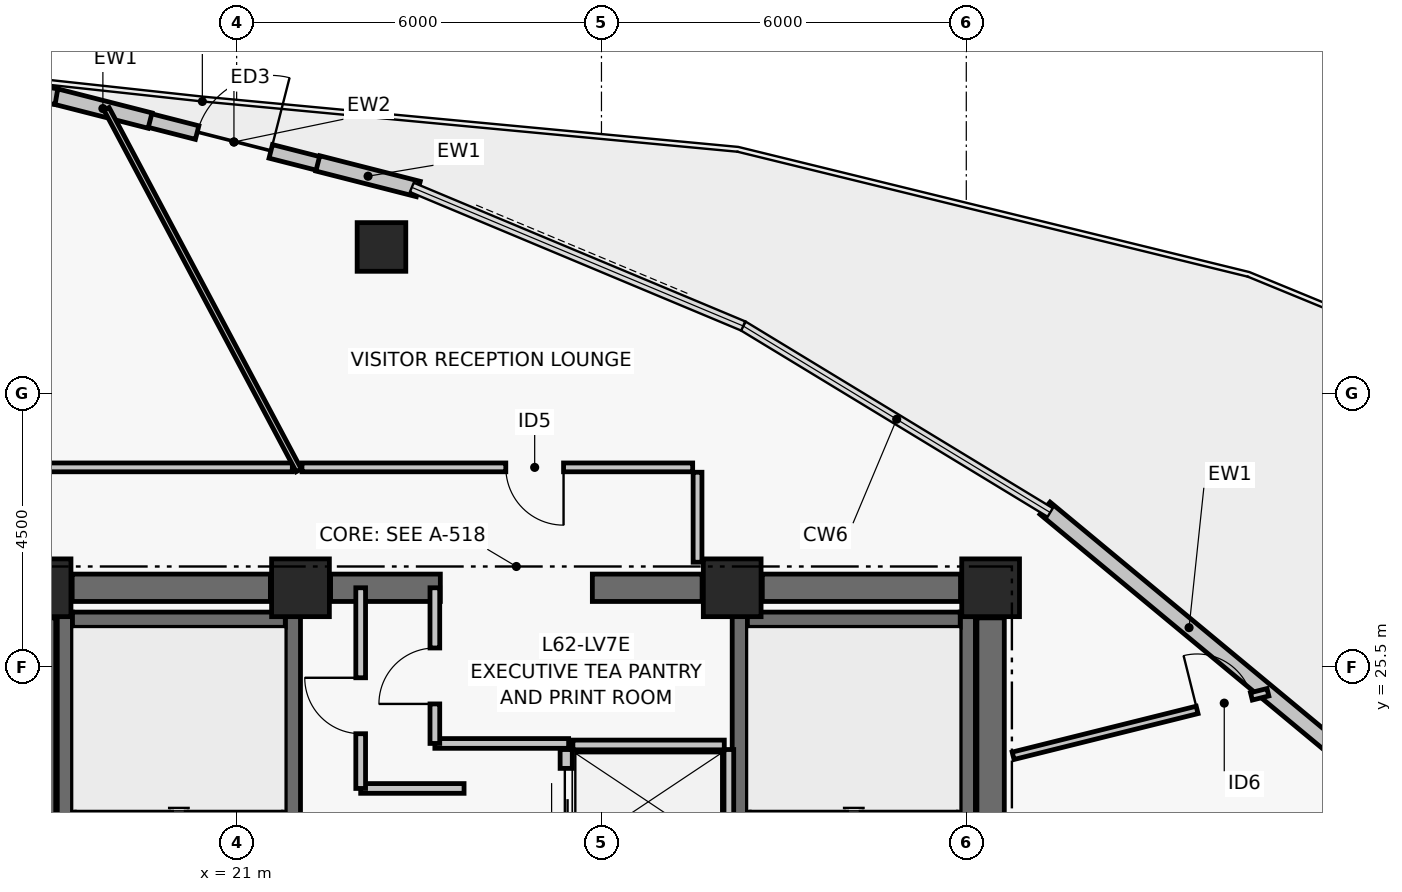
"""IFC4 building model, lengths in metres.
Left out: names, types, materials, properties, quantities, classifications, styles, units other than length and angle.
Written with IfcOpenShell. Run it as: python <this file> out.ifc"""

import sys

from ifc_helpers import new_model, si_unit, direction, frame, frame_2d, origin, origin_2d, place, context, subcontext, project, spatial, rectangle, hollow_rectangle, extrude, element, fill, save


model = new_model("IFC4")
c1 = context("Model", 3, precision=1e-05, world=origin(), true_north=direction((0.0, 1.0)))
c2 = subcontext(c1, "Body", "Model", "MODEL_VIEW")
j1 = project(units=[si_unit("LENGTHUNIT", "METRE"), si_unit("PLANEANGLEUNIT", "RADIAN")], contexts=[c1])
p1 = place(None, origin())
s1 = spatial("IfcSite", under=j1, at=p1, CompositionType="ELEMENT")
p2 = place(p1, origin())
s2 = spatial("IfcBuilding", under=s1, at=p2, CompositionType="ELEMENT")
p3 = place(p2, frame((0.0, 0.0, 247.14)))
s3 = spatial("IfcBuildingStorey", under=s2, at=p3, CompositionType="ELEMENT", Elevation=247.14)
for number, where, z_axis, x_axis in (
    (1, (17.8, 26.8, 0.0), (0.0, 0.0, 1.0), (1.0, 0.0, 0.0)),
    (2, (22.05, 26.8, 0.0), (0.0, 0.0, 1.0), (1.0, 0.0, 0.0)),
    (3, (29.15, 26.8, 0.0), (0.0, 0.0, 1.0), (1.0, 0.0, 0.0)),
    (4, (33.4, 26.8, 0.0), (0.0, 0.0, 1.0), (1.0, 0.0, 0.0)),
):
    element("IfcColumn", number, at=place(p3, frame(where, z_axis=z_axis, x_axis=x_axis)), inside=s3, PredefinedType="COLUMN", context=c2, shape_type="SweptSolid", body=[
        extrude(rectangle(XDim=0.95, YDim=0.95, at=origin_2d()), origin(), (0.0, 0.0, 1.0), 3.72),
    ])
p4 = place(p3, frame((18.295, 26.8, 0.0), z_axis=(0.0, 0.0, 1.0), x_axis=(1.0, 0.0, 0.0)))
e5 = element("IfcWall", 5, at=p4, inside=s3, PredefinedType="SHEAR", context=c2, shape_type="SweptSolid", body=[
    extrude(rectangle(XDim=3.26, YDim=0.45, at=frame_2d((1.63, 0.0))), origin(), (0.0, 0.0, 1.0), 3.5),
])
p5 = place(p3, frame((22.545, 26.8, 0.0), z_axis=(0.0, 0.0, 1.0), x_axis=(1.0, 0.0, 0.0)))
e6 = element("IfcWall", 6, at=p5, inside=s3, PredefinedType="SHEAR", context=c2, shape_type="SweptSolid", body=[
    extrude(rectangle(XDim=1.805, YDim=0.45, at=frame_2d((0.903, 0.0))), origin(), (0.0, 0.0, 1.0), 3.5),
])
p6 = place(p3, frame((26.85, 26.8, 0.0), z_axis=(0.0, 0.0, 1.0), x_axis=(1.0, 0.0, 0.0)))
e7 = element("IfcWall", 7, at=p6, inside=s3, PredefinedType="SHEAR", context=c2, shape_type="SweptSolid", body=[
    extrude(rectangle(XDim=1.805, YDim=0.45, at=frame_2d((0.902, 0.0))), origin(), (0.0, 0.0, 1.0), 3.5),
])
p7 = place(p3, frame((29.645, 26.8, 0.0), z_axis=(0.0, 0.0, 1.0), x_axis=(1.0, 0.0, 0.0)))
e8 = element("IfcWall", 8, at=p7, inside=s3, PredefinedType="SHEAR", context=c2, shape_type="SweptSolid", body=[
    extrude(rectangle(XDim=3.26, YDim=0.45, at=frame_2d((1.63, 0.0))), origin(), (0.0, 0.0, 1.0), 3.5),
])
for number, where, z_axis, x_axis in (
    (9, (17.8, 17.695, 0.0), (0.0, 0.0, 1.0), (0.0, 1.0, 0.0)),
    (10, (33.4, 17.695, 0.0), (0.0, 0.0, 1.0), (0.0, 1.0, 0.0)),
):
    element("IfcWall", number, at=place(p3, frame(where, z_axis=z_axis, x_axis=x_axis)), inside=s3, PredefinedType="SHEAR", context=c2, shape_type="SweptSolid", body=[
        extrude(rectangle(XDim=8.61, YDim=0.45, at=frame_2d((4.305, 0.0))), origin(), (0.0, 0.0, 1.0), 3.5),
    ])
p8 = place(p3, frame((18.175, 17.6, 0.0), z_axis=(0.0, 0.0, 1.0), x_axis=(0.0, 1.0, 0.0)))
e11 = element("IfcWall", 11, at=p8, inside=s3, PredefinedType="SHEAR", context=c2, shape_type="SweptSolid", body=[
    extrude(rectangle(XDim=8.8, YDim=0.25, at=frame_2d((4.4, 0.0))), origin(), (0.0, 0.0, 1.0), 3.5),
])
p9 = place(p3, frame((21.925, 17.6, 0.0), z_axis=(0.0, 0.0, 1.0), x_axis=(0.0, 1.0, 0.0)))
e12 = element("IfcWall", 12, at=p9, inside=s3, PredefinedType="SHEAR", context=c2, shape_type="SweptSolid", body=[
    extrude(rectangle(XDim=8.8, YDim=0.25, at=frame_2d((4.4, 0.0))), origin(), (0.0, 0.0, 1.0), 3.5),
])
p10 = place(p9, frame((0.35, 0.0, 0.0)))
e13 = element("IfcOpeningElement", 13, at=p10, cuts=e12, PredefinedType="OPENING", context=c2, shape_type="SweptSolid", body=[
    extrude(rectangle(XDim=1.05, YDim=2.08, at=frame_2d((0.525, 1.04))), frame((0.0, 0.135, 0.0), z_axis=(0.0, -1.0, 0.0), x_axis=(1.0, 0.0, 0.0)), (0.0, 0.0, 1.0), 0.27),
])
p11 = place(p3, frame((18.3, 26.275, 0.0), z_axis=(0.0, 0.0, 1.0), x_axis=(1.0, 0.0, 0.0)))
e14 = element("IfcWall", 14, at=p11, inside=s3, PredefinedType="SHEAR", context=c2, shape_type="SweptSolid", body=[
    extrude(rectangle(XDim=3.5, YDim=0.25, at=frame_2d((1.75, 0.0))), origin(), (0.0, 0.0, 1.0), 3.5),
])
p12 = place(p3, frame((29.275, 17.6, 0.0), z_axis=(0.0, 0.0, 1.0), x_axis=(0.0, 1.0, 0.0)))
e15 = element("IfcWall", 15, at=p12, inside=s3, PredefinedType="SHEAR", context=c2, shape_type="SweptSolid", body=[
    extrude(rectangle(XDim=8.8, YDim=0.25, at=frame_2d((4.4, 0.0))), origin(), (0.0, 0.0, 1.0), 3.5),
])
p13 = place(p12, frame((0.35, 0.0, 0.0)))
e16 = element("IfcOpeningElement", 16, at=p13, cuts=e15, PredefinedType="OPENING", context=c2, shape_type="SweptSolid", body=[
    extrude(rectangle(XDim=1.05, YDim=2.08, at=frame_2d((0.525, 1.04))), frame((0.0, 0.135, 0.0), z_axis=(0.0, -1.0, 0.0), x_axis=(1.0, 0.0, 0.0)), (0.0, 0.0, 1.0), 0.27),
])
p14 = place(p3, frame((33.025, 17.6, 0.0), z_axis=(0.0, 0.0, 1.0), x_axis=(0.0, 1.0, 0.0)))
e17 = element("IfcWall", 17, at=p14, inside=s3, PredefinedType="SHEAR", context=c2, shape_type="SweptSolid", body=[
    extrude(rectangle(XDim=8.8, YDim=0.25, at=frame_2d((4.4, 0.0))), origin(), (0.0, 0.0, 1.0), 3.5),
])
p15 = place(p3, frame((29.4, 26.275, 0.0), z_axis=(0.0, 0.0, 1.0), x_axis=(1.0, 0.0, 0.0)))
e18 = element("IfcWall", 18, at=p15, inside=s3, PredefinedType="SHEAR", context=c2, shape_type="SweptSolid", body=[
    extrude(rectangle(XDim=3.5, YDim=0.25, at=frame_2d((1.75, 0.0))), origin(), (0.0, 0.0, 1.0), 3.5),
])
p16 = place(p3, frame((23.382, 32.405, 0.0), z_axis=(0.0, 0.0, 1.0), x_axis=(1.0, 0.0, 0.0)))
e19 = element("IfcColumn", 19, at=p16, inside=s3, PredefinedType="COLUMN", context=c2, shape_type="SweptSolid", body=[
    extrude(hollow_rectangle(XDim=0.8, YDim=0.8, WallThickness=0.035, at=origin_2d()), origin(), (0.0, 0.0, 1.0), 3.72),
])
p17 = place(p3, frame((19.564, 34.486, 0.0), z_axis=(0.0, 0.0, 1.0), x_axis=(0.968966245317, -0.247193073198, 0.0)))
e20 = element("IfcWall", 20, at=p17, inside=s3, PredefinedType="PARTITIONING", context=c2, shape_type="SweptSolid", body=[
    extrude(rectangle(XDim=2.872, YDim=0.23, at=frame_2d((1.436, 0.0))), origin(), (0.0, 0.0, 1.0), 3.5),
])
p18 = place(p17, frame((0.811, 0.0, 0.0)))
e21 = element("IfcOpeningElement", 21, at=p18, cuts=e20, PredefinedType="OPENING", context=c2, shape_type="SweptSolid", body=[
    extrude(rectangle(XDim=1.25, YDim=2.1, at=frame_2d((0.625, 1.05))), frame((0.0, 0.125, 0.0), z_axis=(0.0, -1.0, 0.0), x_axis=(1.0, 0.0, 0.0)), (0.0, 0.0, 1.0), 0.25),
])
p19 = place(p3, frame((34.295, 28.108, 0.0), z_axis=(0.0, 0.0, 1.0), x_axis=(0.769779830138, -0.638309496337, 0.0)))
e22 = element("IfcWall", 22, at=p19, inside=s3, PredefinedType="PARTITIONING", context=c2, shape_type="SweptSolid", body=[
    extrude(rectangle(XDim=6.154, YDim=0.26, at=frame_2d((3.077, 0.0))), origin(), (0.0, 0.0, 1.0), 3.5),
])
p20 = place(p3, frame((22.335, 33.779, 0.0), z_axis=(0.0, 0.0, 1.0), x_axis=(0.968986308148, -0.247114416055, 0.0)))
e23 = element("IfcWall", 23, at=p20, inside=s3, PredefinedType="PARTITIONING", context=c2, shape_type="SweptSolid", body=[
    extrude(rectangle(XDim=1.705, YDim=0.26, at=frame_2d((0.853, 0.0))), origin(), (0.0, 0.0, 1.0), 3.5),
])
p21 = place(p3, frame((18.024, 34.879, 0.0), z_axis=(0.0, 0.0, 1.0), x_axis=(0.968974449895, -0.247160910036, 0.0)))
e24 = element("IfcWall", 24, at=p21, inside=s3, PredefinedType="PARTITIONING", context=c2, shape_type="SweptSolid", body=[
    extrude(rectangle(XDim=1.601, YDim=0.26, at=frame_2d((0.801, 0.0))), origin(), (0.0, 0.0, 1.0), 3.5),
])
p22 = place(p3, frame((14.9, 35.409, 0.0), z_axis=(0.0, 0.0, 1.0), x_axis=(0.985889432766, -0.167397808709, 0.0)))
e25 = element("IfcWall", 25, at=p22, inside=s3, PredefinedType="PARTITIONING", context=c2, shape_type="SweptSolid", body=[
    extrude(rectangle(XDim=3.181, YDim=0.26, at=frame_2d((1.59, 0.0))), origin(), (0.0, 0.0, 1.0), 3.5),
])
p23 = place(p3, frame((26.42, 22.42, 0.0), z_axis=(0.0, 0.0, 1.0), x_axis=(0.0, 1.0, 0.0)))
e26 = element("IfcWall", 26, at=p23, inside=s3, PredefinedType="PARTITIONING", context=c2, shape_type="SweptSolid", body=[
    extrude(rectangle(XDim=1.72, YDim=0.2, at=frame_2d((0.86, 0.0))), origin(), (0.0, 0.0, 1.0), 3.5),
])
p24 = place(p23, frame((0.31, 0.0, 0.0)))
e27 = element("IfcOpeningElement", 27, at=p24, cuts=e26, PredefinedType="OPENING", context=c2, shape_type="SweptSolid", body=[
    extrude(rectangle(XDim=1.1, YDim=2.08, at=frame_2d((0.55, 1.04))), frame((0.0, 0.11, 0.0), z_axis=(0.0, -1.0, 0.0), x_axis=(1.0, 0.0, 0.0)), (0.0, 0.0, 1.0), 0.22),
])
p25 = place(p3, frame((29.095, 20.56, 0.0), z_axis=(0.0, 0.0, 1.0), x_axis=(0.0, 1.0, 0.0)))
e28 = element("IfcWall", 28, at=p25, inside=s3, PredefinedType="PARTITIONING", context=c2, shape_type="SweptSolid", body=[
    extrude(rectangle(XDim=3.58, YDim=0.16, at=frame_2d((1.79, 0.0))), origin(), (0.0, 0.0, 1.0), 3.5),
])
p26 = place(p3, frame((26.53, 24.215, 0.0), z_axis=(0.0, 0.0, 1.0), x_axis=(1.0, 0.0, 0.0)))
e29 = element("IfcWall", 29, at=p26, inside=s3, PredefinedType="PARTITIONING", context=c2, shape_type="SweptSolid", body=[
    extrude(rectangle(XDim=2.49, YDim=0.16, at=frame_2d((1.245, 0.0))), origin(), (0.0, 0.0, 1.0), 3.5),
])
p27 = place(p3, frame((23.04, 23.5, 0.0), z_axis=(0.0, 0.0, 1.0), x_axis=(1.0, 0.0, 0.0)))
e30 = element("IfcWall", 30, at=p27, inside=s3, PredefinedType="PARTITIONING", context=c2, shape_type="SweptSolid", body=[
    extrude(rectangle(XDim=1.7, YDim=0.16, at=frame_2d((0.85, 0.0))), origin(), (0.0, 0.0, 1.0), 3.5),
])
p28 = place(p3, frame((23.04, 23.5, 0.0), z_axis=(0.0, 0.0, 1.0), x_axis=(0.0, 1.0, 0.0)))
e31 = element("IfcWall", 31, at=p28, inside=s3, PredefinedType="PARTITIONING", context=c2, shape_type="SweptSolid", body=[
    extrude(rectangle(XDim=3.3, YDim=0.16, at=frame_2d((1.65, 0.0))), origin(), (0.0, 0.0, 1.0), 2.63),
])
p29 = place(p28, frame((0.9, 0.0, 0.0)))
e32 = element("IfcOpeningElement", 32, at=p29, cuts=e31, PredefinedType="OPENING", context=c2, shape_type="SweptSolid", body=[
    extrude(rectangle(XDim=0.92, YDim=2.05, at=frame_2d((0.46, 1.025))), frame((0.0, 0.09, 0.0), z_axis=(0.0, -1.0, 0.0), x_axis=(1.0, 0.0, 0.0)), (0.0, 0.0, 1.0), 0.18),
])
p30 = place(p3, frame((24.26, 24.24, 0.0), z_axis=(0.0, 0.0, 1.0), x_axis=(1.0, 0.0, 0.0)))
e33 = element("IfcWall", 33, at=p30, inside=s3, PredefinedType="PARTITIONING", context=c2, shape_type="SweptSolid", body=[
    extrude(rectangle(XDim=2.2, YDim=0.16, at=frame_2d((1.1, 0.0))), origin(), (0.0, 0.0, 1.0), 3.5),
])
p31 = place(p3, frame((24.26, 24.24, 0.0), z_axis=(0.0, 0.0, 1.0), x_axis=(0.0, 1.0, 0.0)))
e34 = element("IfcWall", 34, at=p31, inside=s3, PredefinedType="PARTITIONING", context=c2, shape_type="SweptSolid", body=[
    extrude(rectangle(XDim=2.56, YDim=0.16, at=frame_2d((1.28, 0.0))), origin(), (0.0, 0.0, 1.0), 2.63),
])
p32 = place(p31, frame((0.65, 0.0, 0.0)))
e35 = element("IfcOpeningElement", 35, at=p32, cuts=e34, PredefinedType="OPENING", context=c2, shape_type="SweptSolid", body=[
    extrude(rectangle(XDim=0.92, YDim=2.05, at=frame_2d((0.46, 1.025))), frame((0.0, 0.09, 0.0), z_axis=(0.0, -1.0, 0.0), x_axis=(1.0, 0.0, 0.0)), (0.0, 0.0, 1.0), 0.18),
])
p33 = place(p3, frame((28.58, 27.22, 0.0), z_axis=(0.0, 0.0, 1.0), x_axis=(0.0, 1.0, 0.0)))
e36 = element("IfcWall", 36, at=p33, inside=s3, PredefinedType="PARTITIONING", context=c2, shape_type="SweptSolid", body=[
    extrude(rectangle(XDim=1.48, YDim=0.145, at=frame_2d((0.74, 0.0))), origin(), (0.0, 0.0, 1.0), 2.63),
])
p34 = place(p3, frame((28.5, 28.78, 0.0), z_axis=(0.0, 0.0, 1.0), x_axis=(-1.0, 0.0, 0.0)))
e37 = element("IfcWall", 37, at=p34, inside=s3, PredefinedType="PARTITIONING", context=c2, shape_type="SweptSolid", body=[
    extrude(rectangle(XDim=6.426, YDim=0.145, at=frame_2d((3.213, 0.0))), origin(), (0.0, 0.0, 1.0), 2.78),
])
p35 = place(p34, frame((2.123, 0.0, 0.0)))
e38 = element("IfcOpeningElement", 38, at=p35, cuts=e37, PredefinedType="OPENING", context=c2, shape_type="SweptSolid", body=[
    extrude(rectangle(XDim=0.95, YDim=2.06, at=frame_2d((0.475, 1.03))), frame((0.0, 0.083, 0.0), z_axis=(0.0, -1.0, 0.0), x_axis=(1.0, 0.0, 0.0)), (0.0, 0.0, 1.0), 0.165),
])
p36 = place(p3, frame((21.916, 28.78, 0.0), z_axis=(0.0, 0.0, 1.0), x_axis=(-1.0, 0.0, 0.0)))
e39 = element("IfcWall", 39, at=p36, inside=s3, PredefinedType="PARTITIONING", context=c2, shape_type="SweptSolid", body=[
    extrude(rectangle(XDim=4.376, YDim=0.145, at=frame_2d((2.188, 0.0))), origin(), (0.0, 0.0, 1.0), 3.13),
])
p37 = place(p3, frame((33.77, 24.037, 0.0), z_axis=(0.0, 0.0, 1.0), x_axis=(0.970305215228, 0.241883834312, 0.0)))
e40 = element("IfcWall", 40, at=p37, inside=s3, PredefinedType="PARTITIONING", context=c2, shape_type="SweptSolid", body=[
    extrude(rectangle(XDim=4.319, YDim=0.125, at=frame_2d((2.159, 0.0))), origin(), (0.0, 0.0, 1.0), 2.63),
])
p38 = place(p37, frame((3.119, 0.0, 0.0)))
e41 = element("IfcOpeningElement", 41, at=p38, cuts=e40, PredefinedType="OPENING", context=c2, shape_type="SweptSolid", body=[
    extrude(rectangle(XDim=0.92, YDim=2.05, at=frame_2d((0.46, 1.025))), frame((0.0, 0.073, 0.0), z_axis=(0.0, -1.0, 0.0), x_axis=(1.0, 0.0, 0.0)), (0.0, 0.0, 1.0), 0.145),
])
p39 = place(p3, frame((22.021, 28.73, 0.0), z_axis=(0.0, 0.0, 1.0), x_axis=(-0.469464454367, 0.882951372435, 0.0)))
e42 = element("IfcWall", 42, at=p39, inside=s3, PredefinedType="PARTITIONING", context=c2, shape_type="SweptSolid", body=[
    extrude(rectangle(XDim=6.734, YDim=0.095, at=frame_2d((3.367, 0.0))), origin(), (0.0, 0.0, 1.0), 2.98),
])
p40 = place(p18, origin())
e43 = element("IfcDoor", 43, at=p40, inside=s3, OperationType="SINGLE_SWING_RIGHT", PredefinedType="DOOR", context=c2, shape_type="SweptSolid", body=[
    extrude(rectangle(XDim=1.25, YDim=2.1, at=frame_2d((0.625, 1.05))), frame((0.0, 0.025, 0.0), z_axis=(0.0, -1.0, 0.0), x_axis=(1.0, 0.0, 0.0)), (0.0, 0.0, 1.0), 0.05),
])
fill(e21, e43)
p41 = place(p24, origin())
e44 = element("IfcDoor", 44, at=p41, inside=s3, OperationType="DOUBLE_DOOR_SLIDING", PredefinedType="DOOR", context=c2, shape_type="SweptSolid", body=[
    extrude(rectangle(XDim=1.1, YDim=2.08, at=frame_2d((0.55, 1.04))), frame((0.0, 0.025, 0.0), z_axis=(0.0, -1.0, 0.0), x_axis=(1.0, 0.0, 0.0)), (0.0, 0.0, 1.0), 0.05),
])
fill(e27, e44)
p42 = place(p29, origin())
e45 = element("IfcDoor", 45, at=p42, inside=s3, OperationType="SINGLE_SWING_RIGHT", PredefinedType="DOOR", context=c2, shape_type="SweptSolid", body=[
    extrude(rectangle(XDim=0.92, YDim=2.05, at=frame_2d((0.46, 1.025))), frame((0.0, 0.025, 0.0), z_axis=(0.0, -1.0, 0.0), x_axis=(1.0, 0.0, 0.0)), (0.0, 0.0, 1.0), 0.05),
])
fill(e32, e45)
p43 = place(p32, origin())
e46 = element("IfcDoor", 46, at=p43, inside=s3, OperationType="SINGLE_SWING_LEFT", PredefinedType="DOOR", context=c2, shape_type="SweptSolid", body=[
    extrude(rectangle(XDim=0.92, YDim=2.05, at=frame_2d((0.46, 1.025))), frame((0.0, 0.025, 0.0), z_axis=(0.0, -1.0, 0.0), x_axis=(1.0, 0.0, 0.0)), (0.0, 0.0, 1.0), 0.05),
])
fill(e35, e46)
p44 = place(p35, origin())
e47 = element("IfcDoor", 47, at=p44, inside=s3, OperationType="SINGLE_SWING_LEFT", PredefinedType="DOOR", context=c2, shape_type="SweptSolid", body=[
    extrude(rectangle(XDim=0.95, YDim=2.06, at=frame_2d((0.475, 1.03))), frame((0.0, 0.025, 0.0), z_axis=(0.0, -1.0, 0.0), x_axis=(1.0, 0.0, 0.0)), (0.0, 0.0, 1.0), 0.05),
])
fill(e38, e47)
p45 = place(p38, origin())
e48 = element("IfcDoor", 48, at=p45, inside=s3, OperationType="SINGLE_SWING_LEFT", PredefinedType="DOOR", context=c2, shape_type="SweptSolid", body=[
    extrude(rectangle(XDim=0.92, YDim=2.05, at=frame_2d((0.46, 1.025))), frame((0.0, 0.025, 0.0), z_axis=(0.0, -1.0, 0.0), x_axis=(1.0, 0.0, 0.0)), (0.0, 0.0, 1.0), 0.05),
])
fill(e41, e48)
save(model, sys.argv[1])
